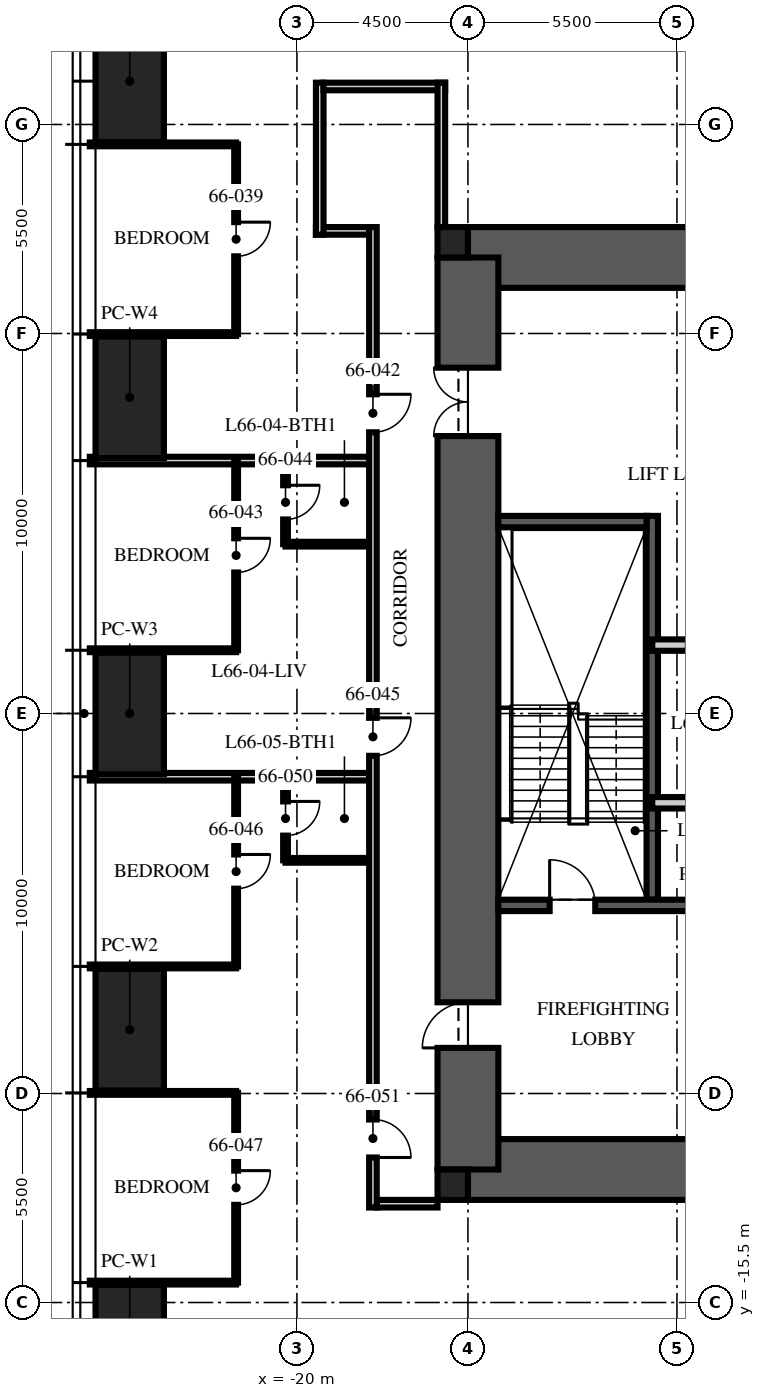
"""IFC4 building model, lengths in metres.
Left out: names, types, materials, properties, quantities, classifications, styles, units other than length and angle.
Written with IfcOpenShell. Run it as: python <this file> out.ifc"""

import sys

from ifc_helpers import new_model, si_unit, direction, frame, frame_2d, origin, origin_2d, place, context, subcontext, project, spatial, rectangle, hollow_rectangle, extrude, element, fill, save


model = new_model("IFC4")
c1 = context("Model", 3, precision=1e-05, world=origin(), true_north=direction((0.0, 1.0)))
c2 = subcontext(c1, "Body", "Model", "MODEL_VIEW")
j1 = project(units=[si_unit("LENGTHUNIT", "METRE"), si_unit("PLANEANGLEUNIT", "RADIAN")], contexts=[c1])
p1 = place(None, origin())
s1 = spatial("IfcSite", under=j1, at=p1, CompositionType="ELEMENT")
p2 = place(p1, origin())
s2 = spatial("IfcBuilding", under=s1, at=p2, CompositionType="ELEMENT")
p3 = place(p2, frame((0.0, 0.0, 263.25)))
s3 = spatial("IfcBuildingStorey", under=s2, at=p3, CompositionType="ELEMENT", Elevation=263.25)
for number, where, z_axis, x_axis in (
    (1, (-15.5, 12.0, -0.25), (0.0, 0.0, 1.0), (1.0, 0.0, 0.0)),
    (2, (-15.5, -12.0, -0.25), (0.0, 0.0, 1.0), (1.0, 0.0, 0.0)),
):
    element("IfcWall", number, at=place(p3, frame(where, z_axis=z_axis, x_axis=x_axis)), inside=s3, PredefinedType="SHEAR", context=c2, shape_type="SweptSolid", body=[
        extrude(rectangle(XDim=31.0, YDim=1.6, at=frame_2d((15.5, 0.0))), origin(), (0.0, 0.0, 1.0), 3.75),
    ])
p4 = place(p3, frame((-15.5, -12.0, -0.25), z_axis=(0.0, 0.0, 1.0), x_axis=(0.0, 1.0, 0.0)))
e3 = element("IfcWall", 3, at=p4, inside=s3, PredefinedType="SHEAR", context=c2, shape_type="SweptSolid", body=[
    extrude(rectangle(XDim=24.0, YDim=1.6, at=frame_2d((12.0, 0.0))), origin(), (0.0, 0.0, 1.0), 3.75),
])
p5 = place(p4, frame((3.2, 0.0, 0.25)))
e4 = element("IfcOpeningElement", 4, at=p5, cuts=e3, PredefinedType="OPENING", context=c2, shape_type="SweptSolid", body=[
    extrude(rectangle(XDim=1.2, YDim=2.1, at=frame_2d((0.6, 1.05))), frame((0.0, 0.81, 0.0), z_axis=(0.0, -1.0, 0.0), x_axis=(1.0, 0.0, 0.0)), (0.0, 0.0, 1.0), 1.62),
])
p6 = place(p4, frame((19.3, 0.0, 0.25)))
e5 = element("IfcOpeningElement", 5, at=p6, cuts=e3, PredefinedType="OPENING", context=c2, shape_type="SweptSolid", body=[
    extrude(rectangle(XDim=1.8, YDim=2.1, at=frame_2d((0.9, 1.05))), frame((0.0, 0.81, 0.0), z_axis=(0.0, -1.0, 0.0), x_axis=(1.0, 0.0, 0.0)), (0.0, 0.0, 1.0), 1.62),
])
for number, where, z_axis, x_axis in (
    (6, (-15.9, 12.4, -0.25), (0.0, 0.0, 1.0), (1.0, 0.0, 0.0)),
    (7, (-15.9, -12.4, -0.25), (0.0, 0.0, 1.0), (1.0, 0.0, 0.0)),
):
    element("IfcColumn", number, at=place(p3, frame(where, z_axis=z_axis, x_axis=x_axis)), inside=s3, PredefinedType="COLUMN", context=c2, shape_type="SweptSolid", body=[
        extrude(rectangle(XDim=0.8, YDim=0.8, at=origin_2d()), origin(), (0.0, 0.0, 1.0), 3.75),
    ])
for number, where, z_axis, x_axis in (
    (8, (-24.4, -16.64, 0.0), (0.0, 0.0, 1.0), (0.0, 1.0, 0.0)),
    (9, (-24.4, -8.32, 0.0), (0.0, 0.0, 1.0), (0.0, 1.0, 0.0)),
    (10, (-24.4, 0.0, 0.0), (0.0, 0.0, 1.0), (0.0, 1.0, 0.0)),
    (11, (-24.4, 8.32, 0.0), (0.0, 0.0, 1.0), (0.0, 1.0, 0.0)),
    (12, (-24.4, 16.64, 0.0), (0.0, 0.0, 1.0), (0.0, 1.0, 0.0)),
):
    element("IfcColumn", number, at=place(p3, frame(where, z_axis=z_axis, x_axis=x_axis)), inside=s3, PredefinedType="COLUMN", context=c2, shape_type="SweptSolid", body=[
        extrude(hollow_rectangle(XDim=3.2, YDim=1.8, WallThickness=0.14, at=origin_2d()), origin(), (0.0, 0.0, 1.0), 3.75),
    ])
p7 = place(p3, frame((-10.65, -4.9, 0.0), z_axis=(0.0, 0.0, 1.0), x_axis=(0.0, 1.0, 0.0)))
e13 = element("IfcWall", 13, at=p7, inside=s3, PredefinedType="SOLIDWALL", context=c2, shape_type="SweptSolid", body=[
    extrude(rectangle(XDim=10.1, YDim=0.3, at=frame_2d((5.05, 0.0))), origin(), (0.0, 0.0, 1.0), 3.5),
])
p8 = place(p3, frame((-14.7, -5.05, 0.0), z_axis=(0.0, 0.0, 1.0), x_axis=(1.0, 0.0, 0.0)))
e14 = element("IfcWall", 14, at=p8, inside=s3, PredefinedType="SOLIDWALL", context=c2, shape_type="SweptSolid", body=[
    extrude(rectangle(XDim=5.9, YDim=0.3, at=frame_2d((2.95, 0.0))), origin(), (0.0, 0.0, 1.0), 3.5),
])
p9 = place(p8, frame((1.35, 0.0, 0.0)))
e15 = element("IfcOpeningElement", 15, at=p9, cuts=e14, PredefinedType="OPENING", context=c2, shape_type="SweptSolid", body=[
    extrude(rectangle(XDim=1.2, YDim=2.1, at=frame_2d((0.6, 1.05))), frame((0.0, 0.16, 0.0), z_axis=(0.0, -1.0, 0.0), x_axis=(1.0, 0.0, 0.0)), (0.0, 0.0, 1.0), 0.32),
])
p10 = place(p3, frame((-14.7, 5.05, 0.0), z_axis=(0.0, 0.0, 1.0), x_axis=(1.0, 0.0, 0.0)))
e16 = element("IfcWall", 16, at=p10, inside=s3, PredefinedType="SOLIDWALL", context=c2, shape_type="SweptSolid", body=[
    extrude(rectangle(XDim=3.9, YDim=0.3, at=frame_2d((1.95, 0.0))), origin(), (0.0, 0.0, 1.0), 3.5),
])
p11 = place(p3, frame((-10.65, 1.8, 0.0), z_axis=(0.0, 0.0, 1.0), x_axis=(1.0, 0.0, 0.0)))
e17 = element("IfcWall", 17, at=p11, inside=s3, PredefinedType="PARTITIONING", context=c2, shape_type="SweptSolid", body=[
    extrude(rectangle(XDim=21.3, YDim=0.3, at=frame_2d((10.65, 0.0))), origin(), (0.0, 0.0, 1.0), 3.5),
])
p12 = place(p11, frame((10.05, 0.0, 0.0)))
e18 = element("IfcOpeningElement", 18, at=p12, cuts=e17, PredefinedType="OPENING", context=c2, shape_type="SweptSolid", body=[
    extrude(rectangle(XDim=1.2, YDim=2.1, at=frame_2d((0.6, 1.05))), frame((0.0, 0.16, 0.0), z_axis=(0.0, -1.0, 0.0), x_axis=(1.0, 0.0, 0.0)), (0.0, 0.0, 1.0), 0.32),
])
p13 = place(p11, frame((0.938, 0.0, 0.0)))
e19 = element("IfcOpeningElement", 19, at=p13, cuts=e17, PredefinedType="OPENING", context=c2, shape_type="SweptSolid", body=[
    extrude(rectangle(XDim=0.9, YDim=2.1, at=frame_2d((0.45, 1.05))), frame((0.0, 0.16, 0.0), z_axis=(0.0, -1.0, 0.0), x_axis=(1.0, 0.0, 0.0)), (0.0, 0.0, 1.0), 0.32),
])
p14 = place(p3, frame((-10.65, -2.35, 0.0), z_axis=(0.0, 0.0, 1.0), x_axis=(1.0, 0.0, 0.0)))
e20 = element("IfcWall", 20, at=p14, inside=s3, PredefinedType="PARTITIONING", context=c2, shape_type="SweptSolid", body=[
    extrude(rectangle(XDim=5.55, YDim=0.3, at=frame_2d((2.775, 0.0))), origin(), (0.0, 0.0, 1.0), 3.5),
])
p15 = place(p3, frame((-18.1, 12.7, 0.0), z_axis=(0.0, 0.0, 1.0), x_axis=(-1.0, 0.0, 0.0)))
e21 = element("IfcWall", 21, at=p15, inside=s3, PredefinedType="PARTITIONING", context=c2, shape_type="SweptSolid", body=[
    extrude(rectangle(XDim=1.4, YDim=0.2, at=frame_2d((0.7, 0.0))), origin(), (0.0, 0.0, 1.0), 2.81),
])
p16 = place(p3, frame((-19.4, 12.6, 0.0), z_axis=(0.0, 0.0, 1.0), x_axis=(0.0, 1.0, 0.0)))
e22 = element("IfcWall", 22, at=p16, inside=s3, PredefinedType="PARTITIONING", context=c2, shape_type="SweptSolid", body=[
    extrude(rectangle(XDim=4.0, YDim=0.2, at=frame_2d((2.0, 0.0))), origin(), (0.0, 0.0, 1.0), 2.6),
])
p17 = place(p3, frame((-19.3, 16.5, 0.0), z_axis=(0.0, 0.0, 1.0), x_axis=(1.0, 0.0, 0.0)))
e23 = element("IfcWall", 23, at=p17, inside=s3, PredefinedType="PARTITIONING", context=c2, shape_type="SweptSolid", body=[
    extrude(rectangle(XDim=3.2, YDim=0.2, at=frame_2d((1.6, 0.0))), origin(), (0.0, 0.0, 1.0), 2.3),
])
p18 = place(p3, frame((-16.2, 16.6, 0.0), z_axis=(0.0, 0.0, 1.0), x_axis=(0.0, -1.0, 0.0)))
e24 = element("IfcWall", 24, at=p18, inside=s3, PredefinedType="PARTITIONING", context=c2, shape_type="SweptSolid", body=[
    extrude(rectangle(XDim=3.8, YDim=0.2, at=frame_2d((1.9, 0.0))), origin(), (0.0, 0.0, 1.0), 2.3),
])
p19 = place(p3, frame((-16.3, -12.9, 0.0), z_axis=(0.0, 0.0, 1.0), x_axis=(-1.0, 0.0, 0.0)))
e25 = element("IfcWall", 25, at=p19, inside=s3, PredefinedType="PARTITIONING", context=c2, shape_type="SweptSolid", body=[
    extrude(rectangle(XDim=1.6, YDim=0.2, at=frame_2d((0.8, 0.0))), origin(), (0.0, 0.0, 1.0), 2.3),
])
for number, where, z_axis, x_axis in (
    (26, (-21.6, 14.976, 0.0), (0.0, 0.0, 1.0), (-1.0, 0.0, 0.0)),
    (27, (-21.6, 9.984, 0.0), (0.0, 0.0, 1.0), (-1.0, 0.0, 0.0)),
):
    element("IfcWall", number, at=place(p3, frame(where, z_axis=z_axis, x_axis=x_axis)), inside=s3, PredefinedType="PARTITIONING", context=c2, shape_type="SweptSolid", body=[
        extrude(rectangle(XDim=3.85, YDim=0.1, at=frame_2d((1.925, 0.0))), origin(), (0.0, 0.0, 1.0), 2.91),
    ])
p20 = place(p3, frame((-18.1, 6.656, 0.0), z_axis=(0.0, 0.0, 1.0), x_axis=(-1.0, 0.0, 0.0)))
e28 = element("IfcWall", 28, at=p20, inside=s3, PredefinedType="PARTITIONING", context=c2, shape_type="SweptSolid", body=[
    extrude(rectangle(XDim=7.35, YDim=0.2, at=frame_2d((3.675, 0.0))), origin(), (0.0, 0.0, 1.0), 2.91),
])
p21 = place(p3, frame((-21.6, 1.664, 0.0), z_axis=(0.0, 0.0, 1.0), x_axis=(-1.0, 0.0, 0.0)))
e29 = element("IfcWall", 29, at=p21, inside=s3, PredefinedType="PARTITIONING", context=c2, shape_type="SweptSolid", body=[
    extrude(rectangle(XDim=3.85, YDim=0.1, at=frame_2d((1.925, 0.0))), origin(), (0.0, 0.0, 1.0), 2.91),
])
p22 = place(p3, frame((-18.1, -1.664, 0.0), z_axis=(0.0, 0.0, 1.0), x_axis=(-1.0, 0.0, 0.0)))
e30 = element("IfcWall", 30, at=p22, inside=s3, PredefinedType="PARTITIONING", context=c2, shape_type="SweptSolid", body=[
    extrude(rectangle(XDim=7.35, YDim=0.2, at=frame_2d((3.675, 0.0))), origin(), (0.0, 0.0, 1.0), 2.91),
])
for number, where, z_axis, x_axis in (
    (31, (-21.6, -6.656, 0.0), (0.0, 0.0, 1.0), (-1.0, 0.0, 0.0)),
    (32, (-21.6, -9.984, 0.0), (0.0, 0.0, 1.0), (-1.0, 0.0, 0.0)),
    (33, (-21.6, -14.976, 0.0), (0.0, 0.0, 1.0), (-1.0, 0.0, 0.0)),
):
    element("IfcWall", number, at=place(p3, frame(where, z_axis=z_axis, x_axis=x_axis)), inside=s3, PredefinedType="PARTITIONING", context=c2, shape_type="SweptSolid", body=[
        extrude(rectangle(XDim=3.85, YDim=0.1, at=frame_2d((1.925, 0.0))), origin(), (0.0, 0.0, 1.0), 2.91),
    ])
p23 = place(p3, frame((-21.6, 14.976, 0.0), z_axis=(0.0, 0.0, 1.0), x_axis=(0.0, -1.0, 0.0)))
e34 = element("IfcWall", 34, at=p23, inside=s3, PredefinedType="PARTITIONING", context=c2, shape_type="SweptSolid", body=[
    extrude(rectangle(XDim=4.992, YDim=0.1, at=frame_2d((2.496, 0.0))), origin(), (0.0, 0.0, 1.0), 2.81),
])
p24 = place(p23, frame((2.046, 0.0, 0.0)))
e35 = element("IfcOpeningElement", 35, at=p24, cuts=e34, PredefinedType="OPENING", context=c2, shape_type="SweptSolid", body=[
    extrude(rectangle(XDim=0.9, YDim=2.1, at=frame_2d((0.45, 1.05))), frame((0.0, 0.06, 0.0), z_axis=(0.0, -1.0, 0.0), x_axis=(1.0, 0.0, 0.0)), (0.0, 0.0, 1.0), 0.12),
])
p25 = place(p3, frame((-21.6, 6.656, 0.0), z_axis=(0.0, 0.0, 1.0), x_axis=(0.0, -1.0, 0.0)))
e36 = element("IfcWall", 36, at=p25, inside=s3, PredefinedType="PARTITIONING", context=c2, shape_type="SweptSolid", body=[
    extrude(rectangle(XDim=4.992, YDim=0.1, at=frame_2d((2.496, 0.0))), origin(), (0.0, 0.0, 1.0), 2.81),
])
p26 = place(p25, frame((2.046, 0.0, 0.0)))
e37 = element("IfcOpeningElement", 37, at=p26, cuts=e36, PredefinedType="OPENING", context=c2, shape_type="SweptSolid", body=[
    extrude(rectangle(XDim=0.9, YDim=2.1, at=frame_2d((0.45, 1.05))), frame((0.0, 0.06, 0.0), z_axis=(0.0, -1.0, 0.0), x_axis=(1.0, 0.0, 0.0)), (0.0, 0.0, 1.0), 0.12),
])
p27 = place(p3, frame((-20.3, 6.656, 0.0), z_axis=(0.0, 0.0, 1.0), x_axis=(0.0, -1.0, 0.0)))
e38 = element("IfcWall", 38, at=p27, inside=s3, PredefinedType="PARTITIONING", context=c2, shape_type="SweptSolid", body=[
    extrude(rectangle(XDim=2.2, YDim=0.125, at=frame_2d((1.1, 0.0))), origin(), (0.0, 0.0, 1.0), 3.5),
])
p28 = place(p27, frame((0.65, 0.0, 0.0)))
e39 = element("IfcOpeningElement", 39, at=p28, cuts=e38, PredefinedType="OPENING", context=c2, shape_type="SweptSolid", body=[
    extrude(rectangle(XDim=0.9, YDim=2.1, at=frame_2d((0.45, 1.05))), frame((0.0, 0.073, 0.0), z_axis=(0.0, -1.0, 0.0), x_axis=(1.0, 0.0, 0.0)), (0.0, 0.0, 1.0), 0.145),
])
p29 = place(p3, frame((-18.1, 4.456, 0.0), z_axis=(0.0, 0.0, 1.0), x_axis=(-1.0, 0.0, 0.0)))
e40 = element("IfcWall", 40, at=p29, inside=s3, PredefinedType="PARTITIONING", context=c2, shape_type="SweptSolid", body=[
    extrude(rectangle(XDim=2.2, YDim=0.125, at=frame_2d((1.1, 0.0))), origin(), (0.0, 0.0, 1.0), 3.5),
])
p30 = place(p3, frame((-21.6, -1.664, 0.0), z_axis=(0.0, 0.0, 1.0), x_axis=(0.0, -1.0, 0.0)))
e41 = element("IfcWall", 41, at=p30, inside=s3, PredefinedType="PARTITIONING", context=c2, shape_type="SweptSolid", body=[
    extrude(rectangle(XDim=4.992, YDim=0.1, at=frame_2d((2.496, 0.0))), origin(), (0.0, 0.0, 1.0), 2.81),
])
p31 = place(p30, frame((2.046, 0.0, 0.0)))
e42 = element("IfcOpeningElement", 42, at=p31, cuts=e41, PredefinedType="OPENING", context=c2, shape_type="SweptSolid", body=[
    extrude(rectangle(XDim=0.9, YDim=2.1, at=frame_2d((0.45, 1.05))), frame((0.0, 0.06, 0.0), z_axis=(0.0, -1.0, 0.0), x_axis=(1.0, 0.0, 0.0)), (0.0, 0.0, 1.0), 0.12),
])
p32 = place(p3, frame((-21.6, -9.984, 0.0), z_axis=(0.0, 0.0, 1.0), x_axis=(0.0, -1.0, 0.0)))
e43 = element("IfcWall", 43, at=p32, inside=s3, PredefinedType="PARTITIONING", context=c2, shape_type="SweptSolid", body=[
    extrude(rectangle(XDim=4.992, YDim=0.1, at=frame_2d((2.496, 0.0))), origin(), (0.0, 0.0, 1.0), 2.81),
])
p33 = place(p32, frame((2.046, 0.0, 0.0)))
e44 = element("IfcOpeningElement", 44, at=p33, cuts=e43, PredefinedType="OPENING", context=c2, shape_type="SweptSolid", body=[
    extrude(rectangle(XDim=0.9, YDim=2.1, at=frame_2d((0.45, 1.05))), frame((0.0, 0.06, 0.0), z_axis=(0.0, -1.0, 0.0), x_axis=(1.0, 0.0, 0.0)), (0.0, 0.0, 1.0), 0.12),
])
p34 = place(p3, frame((-20.3, -1.664, 0.0), z_axis=(0.0, 0.0, 1.0), x_axis=(0.0, -1.0, 0.0)))
e45 = element("IfcWall", 45, at=p34, inside=s3, PredefinedType="PARTITIONING", context=c2, shape_type="SweptSolid", body=[
    extrude(rectangle(XDim=2.2, YDim=0.125, at=frame_2d((1.1, 0.0))), origin(), (0.0, 0.0, 1.0), 3.5),
])
p35 = place(p34, frame((0.65, 0.0, 0.0)))
e46 = element("IfcOpeningElement", 46, at=p35, cuts=e45, PredefinedType="OPENING", context=c2, shape_type="SweptSolid", body=[
    extrude(rectangle(XDim=0.9, YDim=2.1, at=frame_2d((0.45, 1.05))), frame((0.0, 0.073, 0.0), z_axis=(0.0, -1.0, 0.0), x_axis=(1.0, 0.0, 0.0)), (0.0, 0.0, 1.0), 0.145),
])
p36 = place(p3, frame((-18.1, -3.864, 0.0), z_axis=(0.0, 0.0, 1.0), x_axis=(-1.0, 0.0, 0.0)))
e47 = element("IfcWall", 47, at=p36, inside=s3, PredefinedType="PARTITIONING", context=c2, shape_type="SweptSolid", body=[
    extrude(rectangle(XDim=2.2, YDim=0.125, at=frame_2d((1.1, 0.0))), origin(), (0.0, 0.0, 1.0), 3.5),
])
p37 = place(p3, frame((-18.0, 12.8, 0.0), z_axis=(0.0, 0.0, 1.0), x_axis=(0.0, -1.0, 0.0)))
e48 = element("IfcWall", 48, at=p37, inside=s3, PredefinedType="PARTITIONING", context=c2, shape_type="SweptSolid", body=[
    extrude(rectangle(XDim=25.8, YDim=0.2, at=frame_2d((12.9, 0.0))), origin(), (0.0, 0.0, 1.0), 2.6),
])
p38 = place(p37, frame((4.4, 0.0, 0.0)))
e49 = element("IfcOpeningElement", 49, at=p38, cuts=e48, PredefinedType="OPENING", context=c2, shape_type="SweptSolid", body=[
    extrude(rectangle(XDim=1.0, YDim=2.2, at=frame_2d((0.5, 1.1))), frame((0.0, 0.11, 0.0), z_axis=(0.0, -1.0, 0.0), x_axis=(1.0, 0.0, 0.0)), (0.0, 0.0, 1.0), 0.22),
])
p39 = place(p37, frame((12.914, 0.0, 0.0)))
e50 = element("IfcOpeningElement", 50, at=p39, cuts=e48, PredefinedType="OPENING", context=c2, shape_type="SweptSolid", body=[
    extrude(rectangle(XDim=1.0, YDim=2.2, at=frame_2d((0.5, 1.1))), frame((0.0, 0.11, 0.0), z_axis=(0.0, -1.0, 0.0), x_axis=(1.0, 0.0, 0.0)), (0.0, 0.0, 1.0), 0.22),
])
p40 = place(p37, frame((23.484, 0.0, 0.0)))
e51 = element("IfcOpeningElement", 51, at=p40, cuts=e48, PredefinedType="OPENING", context=c2, shape_type="SweptSolid", body=[
    extrude(rectangle(XDim=1.0, YDim=2.2, at=frame_2d((0.5, 1.1))), frame((0.0, 0.11, 0.0), z_axis=(0.0, -1.0, 0.0), x_axis=(1.0, 0.0, 0.0)), (0.0, 0.0, 1.0), 0.22),
])
p41 = place(p9, origin())
e52 = element("IfcDoor", 52, at=p41, inside=s3, OperationType="SINGLE_SWING_LEFT", PredefinedType="DOOR", context=c2, shape_type="SweptSolid", body=[
    extrude(rectangle(XDim=1.2, YDim=2.1, at=frame_2d((0.6, 1.05))), frame((0.0, 0.025, 0.0), z_axis=(0.0, -1.0, 0.0), x_axis=(1.0, 0.0, 0.0)), (0.0, 0.0, 1.0), 0.05),
])
fill(e15, e52)
p42 = place(p5, origin())
e53 = element("IfcDoor", 53, at=p42, inside=s3, OperationType="SINGLE_SWING_LEFT", PredefinedType="DOOR", context=c2, shape_type="SweptSolid", body=[
    extrude(rectangle(XDim=1.2, YDim=2.1, at=frame_2d((0.6, 1.05))), frame((0.0, 0.025, 0.0), z_axis=(0.0, -1.0, 0.0), x_axis=(1.0, 0.0, 0.0)), (0.0, 0.0, 1.0), 0.05),
])
fill(e4, e53)
p43 = place(p6, origin())
e54 = element("IfcDoor", 54, at=p43, inside=s3, OperationType="DOUBLE_DOOR_SINGLE_SWING", PredefinedType="DOOR", context=c2, shape_type="SweptSolid", body=[
    extrude(rectangle(XDim=1.8, YDim=2.1, at=frame_2d((0.9, 1.05))), frame((0.0, 0.025, 0.0), z_axis=(0.0, -1.0, 0.0), x_axis=(1.0, 0.0, 0.0)), (0.0, 0.0, 1.0), 0.05),
])
fill(e5, e54)
p44 = place(p24, origin())
e55 = element("IfcDoor", 55, at=p44, inside=s3, OperationType="SINGLE_SWING_LEFT", PredefinedType="DOOR", context=c2, shape_type="SweptSolid", body=[
    extrude(rectangle(XDim=0.9, YDim=2.1, at=frame_2d((0.45, 1.05))), frame((0.0, 0.025, 0.0), z_axis=(0.0, -1.0, 0.0), x_axis=(1.0, 0.0, 0.0)), (0.0, 0.0, 1.0), 0.05),
])
fill(e35, e55)
p45 = place(p38, origin())
e56 = element("IfcDoor", 56, at=p45, inside=s3, OperationType="SINGLE_SWING_LEFT", PredefinedType="DOOR", context=c2, shape_type="SweptSolid", body=[
    extrude(rectangle(XDim=1.0, YDim=2.2, at=frame_2d((0.5, 1.1))), frame((0.0, 0.025, 0.0), z_axis=(0.0, -1.0, 0.0), x_axis=(1.0, 0.0, 0.0)), (0.0, 0.0, 1.0), 0.05),
])
fill(e49, e56)
p46 = place(p26, origin())
e57 = element("IfcDoor", 57, at=p46, inside=s3, OperationType="SINGLE_SWING_LEFT", PredefinedType="DOOR", context=c2, shape_type="SweptSolid", body=[
    extrude(rectangle(XDim=0.9, YDim=2.1, at=frame_2d((0.45, 1.05))), frame((0.0, 0.025, 0.0), z_axis=(0.0, -1.0, 0.0), x_axis=(1.0, 0.0, 0.0)), (0.0, 0.0, 1.0), 0.05),
])
fill(e37, e57)
p47 = place(p28, origin())
e58 = element("IfcDoor", 58, at=p47, inside=s3, OperationType="SINGLE_SWING_LEFT", PredefinedType="DOOR", context=c2, shape_type="SweptSolid", body=[
    extrude(rectangle(XDim=0.9, YDim=2.1, at=frame_2d((0.45, 1.05))), frame((0.0, 0.025, 0.0), z_axis=(0.0, -1.0, 0.0), x_axis=(1.0, 0.0, 0.0)), (0.0, 0.0, 1.0), 0.05),
])
fill(e39, e58)
p48 = place(p39, origin())
e59 = element("IfcDoor", 59, at=p48, inside=s3, OperationType="SINGLE_SWING_LEFT", PredefinedType="DOOR", context=c2, shape_type="SweptSolid", body=[
    extrude(rectangle(XDim=1.0, YDim=2.2, at=frame_2d((0.5, 1.1))), frame((0.0, 0.025, 0.0), z_axis=(0.0, -1.0, 0.0), x_axis=(1.0, 0.0, 0.0)), (0.0, 0.0, 1.0), 0.05),
])
fill(e50, e59)
p49 = place(p31, origin())
e60 = element("IfcDoor", 60, at=p49, inside=s3, OperationType="SINGLE_SWING_LEFT", PredefinedType="DOOR", context=c2, shape_type="SweptSolid", body=[
    extrude(rectangle(XDim=0.9, YDim=2.1, at=frame_2d((0.45, 1.05))), frame((0.0, 0.025, 0.0), z_axis=(0.0, -1.0, 0.0), x_axis=(1.0, 0.0, 0.0)), (0.0, 0.0, 1.0), 0.05),
])
fill(e42, e60)
p50 = place(p33, origin())
e61 = element("IfcDoor", 61, at=p50, inside=s3, OperationType="SINGLE_SWING_LEFT", PredefinedType="DOOR", context=c2, shape_type="SweptSolid", body=[
    extrude(rectangle(XDim=0.9, YDim=2.1, at=frame_2d((0.45, 1.05))), frame((0.0, 0.025, 0.0), z_axis=(0.0, -1.0, 0.0), x_axis=(1.0, 0.0, 0.0)), (0.0, 0.0, 1.0), 0.05),
])
fill(e44, e61)
p51 = place(p35, origin())
e62 = element("IfcDoor", 62, at=p51, inside=s3, OperationType="SINGLE_SWING_LEFT", PredefinedType="DOOR", context=c2, shape_type="SweptSolid", body=[
    extrude(rectangle(XDim=0.9, YDim=2.1, at=frame_2d((0.45, 1.05))), frame((0.0, 0.025, 0.0), z_axis=(0.0, -1.0, 0.0), x_axis=(1.0, 0.0, 0.0)), (0.0, 0.0, 1.0), 0.05),
])
fill(e46, e62)
p52 = place(p40, origin())
e63 = element("IfcDoor", 63, at=p52, inside=s3, OperationType="SINGLE_SWING_RIGHT", PredefinedType="DOOR", context=c2, shape_type="SweptSolid", body=[
    extrude(rectangle(XDim=1.0, YDim=2.2, at=frame_2d((0.5, 1.1))), frame((0.0, 0.025, 0.0), z_axis=(0.0, -1.0, 0.0), x_axis=(1.0, 0.0, 0.0)), (0.0, 0.0, 1.0), 0.05),
])
fill(e51, e63)
save(model, sys.argv[1])
